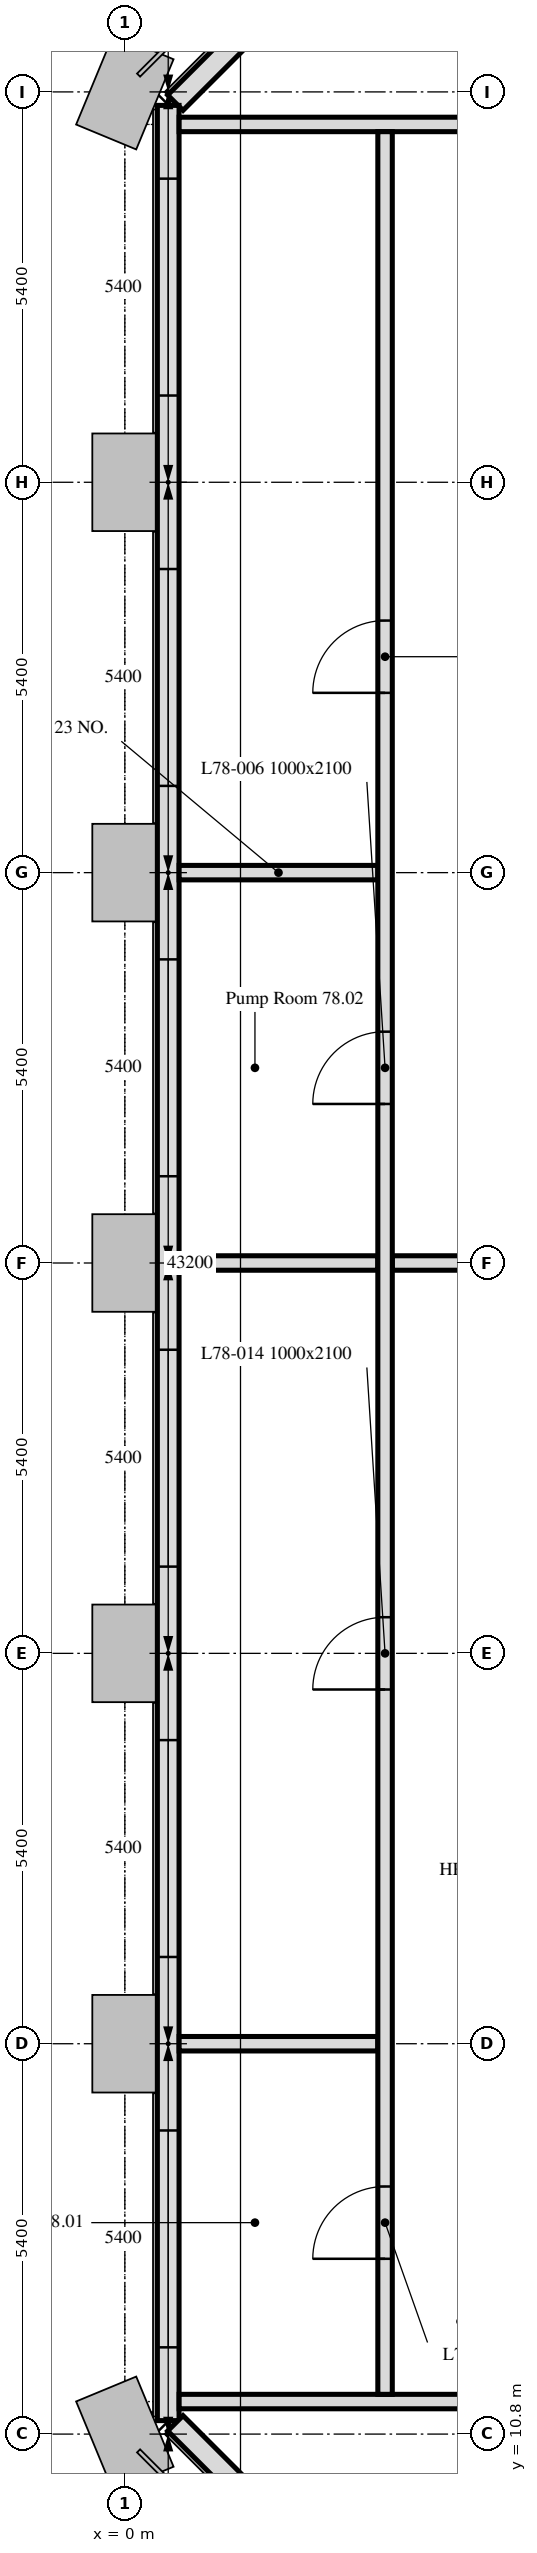
"""IFC4 building model, lengths in metres.
Left out: names, types, materials, properties, quantities, classifications, styles, units other than length and angle.
Written with IfcOpenShell. Run it as: python <this file> out.ifc"""

import sys

from ifc_helpers import new_model, si_unit, direction, frame, frame_2d, origin, place, context, subcontext, project, spatial, polyline, rectangle, outline, extrude, element, fill, save


model = new_model("IFC4")
c1 = context("Model", 3, precision=1e-05, world=origin(), true_north=direction((0.0, 1.0)))
c2 = subcontext(c1, "Body", "Model", "MODEL_VIEW")
j1 = project(units=[si_unit("LENGTHUNIT", "METRE"), si_unit("PLANEANGLEUNIT", "RADIAN")], contexts=[c1])
p1 = place(None, origin())
s1 = spatial("IfcSite", under=j1, at=p1, CompositionType="ELEMENT")
p2 = place(p1, origin())
s2 = spatial("IfcBuilding", under=s1, at=p2, CompositionType="ELEMENT")
p3 = place(p2, frame((0.0, 0.0, 312.7)))
s3 = spatial("IfcBuildingStorey", under=s2, at=p3, CompositionType="ELEMENT", Elevation=312.7)
p4 = place(p3, frame((5.55, 47.901, 0.0), z_axis=(0.0, 0.0, 1.0), x_axis=(-0.707106781187, -0.707106781187, 0.0)))
e1 = element("IfcWall", 1, at=p4, inside=s3, PredefinedType="SOLIDWALL", context=c2, shape_type="SweptSolid", body=[
    extrude(outline(polyline([(0.0, 0.0), (6.86, 0.0), (6.86, 4.2), (6.288, 4.2), (5.716, 4.2), (5.145, 4.2), (4.573, 4.2), (4.001, 4.2), (3.43, 4.2), (2.858, 4.2), (2.287, 4.2), (1.715, 4.2), (1.143, 4.2), (0.572, 4.2), (0.0, 4.2), (0.0, 0.0)])), frame((0.0, 0.15, 0.0), z_axis=(0.0, -1.0, 0.0), x_axis=(1.0, 0.0, 0.0)), (0.0, 0.0, 1.0), 0.3),
])
p5 = place(p3, frame((0.6, 43.014, 0.0), z_axis=(0.0, 0.0, 1.0), x_axis=(0.0, -1.0, 0.0)))
e2 = element("IfcWall", 2, at=p5, inside=s3, PredefinedType="SOLIDWALL", context=c2, shape_type="SweptSolid", body=[
    extrude(outline(polyline([(0.0, 0.0), (32.027, 0.0), (32.027, 4.2), (31.434, 4.2), (30.841, 4.2), (30.248, 4.2), (29.655, 4.2), (29.062, 4.2), (28.469, 4.2), (27.875, 4.2), (27.282, 4.2), (26.689, 4.2), (26.096, 4.2), (25.503, 4.2), (24.91, 4.2), (24.317, 4.2), (23.724, 4.2), (23.131, 4.2), (22.538, 4.2), (21.945, 4.2), (21.352, 4.2), (20.758, 4.2), (20.165, 4.2), (19.572, 4.2), (18.979, 4.2), (18.386, 4.2), (17.793, 4.2), (17.2, 4.2), (16.607, 4.2), (16.014, 4.2), (15.42, 4.2), (14.827, 4.2), (14.234, 4.2), (13.641, 4.2), (13.048, 4.2), (12.455, 4.2), (11.862, 4.2), (11.269, 4.2), (10.676, 4.2), (10.083, 4.2), (9.49, 4.2), (8.896, 4.2), (8.303, 4.2), (7.71, 4.2), (7.117, 4.2), (6.524, 4.2), (5.931, 4.2), (5.338, 4.2), (4.745, 4.2), (4.152, 4.2), (3.559, 4.2), (2.966, 4.2), (2.372, 4.2), (1.779, 4.2), (1.186, 4.2), (0.593, 4.2), (0.0, 4.2), (0.0, 0.0)])), frame((0.0, 0.15, 0.0), z_axis=(0.0, -1.0, 0.0), x_axis=(1.0, 0.0, 0.0)), (0.0, 0.0, 1.0), 0.3),
])
p6 = place(p5, frame((1.014, 0.0, 0.6)))
e3 = element("IfcOpeningElement", 3, at=p6, cuts=e2, PredefinedType="OPENING", context=c2, shape_type="SweptSolid", body=[
    extrude(rectangle(XDim=3.0, YDim=1.8, at=frame_2d((1.5, 0.9))), frame((0.0, 0.16, 0.0), z_axis=(0.0, -1.0, 0.0), x_axis=(1.0, 0.0, 0.0)), (0.0, 0.0, 1.0), 0.32),
])
p7 = place(p5, frame((6.414, 0.0, 0.6)))
e4 = element("IfcOpeningElement", 4, at=p7, cuts=e2, PredefinedType="OPENING", context=c2, shape_type="SweptSolid", body=[
    extrude(rectangle(XDim=3.0, YDim=1.8, at=frame_2d((1.5, 0.9))), frame((0.0, 0.16, 0.0), z_axis=(0.0, -1.0, 0.0), x_axis=(1.0, 0.0, 0.0)), (0.0, 0.0, 1.0), 0.32),
])
p8 = place(p5, frame((11.814, 0.0, 0.6)))
e5 = element("IfcOpeningElement", 5, at=p8, cuts=e2, PredefinedType="OPENING", context=c2, shape_type="SweptSolid", body=[
    extrude(rectangle(XDim=3.0, YDim=1.8, at=frame_2d((1.5, 0.9))), frame((0.0, 0.16, 0.0), z_axis=(0.0, -1.0, 0.0), x_axis=(1.0, 0.0, 0.0)), (0.0, 0.0, 1.0), 0.32),
])
p9 = place(p5, frame((17.214, 0.0, 0.6)))
e6 = element("IfcOpeningElement", 6, at=p9, cuts=e2, PredefinedType="OPENING", context=c2, shape_type="SweptSolid", body=[
    extrude(rectangle(XDim=3.0, YDim=1.8, at=frame_2d((1.5, 0.9))), frame((0.0, 0.16, 0.0), z_axis=(0.0, -1.0, 0.0), x_axis=(1.0, 0.0, 0.0)), (0.0, 0.0, 1.0), 0.32),
])
p10 = place(p5, frame((22.614, 0.0, 0.6)))
e7 = element("IfcOpeningElement", 7, at=p10, cuts=e2, PredefinedType="OPENING", context=c2, shape_type="SweptSolid", body=[
    extrude(rectangle(XDim=3.0, YDim=1.8, at=frame_2d((1.5, 0.9))), frame((0.0, 0.16, 0.0), z_axis=(0.0, -1.0, 0.0), x_axis=(1.0, 0.0, 0.0)), (0.0, 0.0, 1.0), 0.32),
])
p11 = place(p5, frame((28.014, 0.0, 0.6)))
e8 = element("IfcOpeningElement", 8, at=p11, cuts=e2, PredefinedType="OPENING", context=c2, shape_type="SweptSolid", body=[
    extrude(rectangle(XDim=3.0, YDim=1.8, at=frame_2d((1.5, 0.9))), frame((0.0, 0.16, 0.0), z_axis=(0.0, -1.0, 0.0), x_axis=(1.0, 0.0, 0.0)), (0.0, 0.0, 1.0), 0.32),
])
p12 = place(p3, frame((0.699, 10.949, 0.0), z_axis=(0.0, 0.0, 1.0), x_axis=(0.707106781187, -0.707106781187, 0.0)))
e9 = element("IfcWall", 9, at=p12, inside=s3, PredefinedType="SOLIDWALL", context=c2, shape_type="SweptSolid", body=[
    extrude(outline(polyline([(0.0, 0.0), (6.86, 0.0), (6.86, 4.2), (6.288, 4.2), (5.716, 4.2), (5.145, 4.2), (4.573, 4.2), (4.001, 4.2), (3.43, 4.2), (2.858, 4.2), (2.287, 4.2), (1.715, 4.2), (1.143, 4.2), (0.572, 4.2), (0.0, 4.2), (0.0, 0.0)])), frame((0.0, 0.15, 0.0), z_axis=(0.0, -1.0, 0.0), x_axis=(1.0, 0.0, 0.0)), (0.0, 0.0, 1.0), 0.3),
])
p13 = place(p3, frame((0.751, 32.4, 0.0), z_axis=(0.0, 0.0, 1.0), x_axis=(1.0, 0.0, 0.0)))
e10 = element("IfcWall", 10, at=p13, inside=s3, PredefinedType="PARTITIONING", context=c2, shape_type="SweptSolid", body=[
    extrude(rectangle(XDim=2.749, YDim=0.2, at=frame_2d((1.375, 0.0))), origin(), (0.0, 0.0, 1.0), 3.45),
])
p14 = place(p3, frame((42.449, 42.75, 0.0), z_axis=(0.0, 0.0, 1.0), x_axis=(-1.0, 0.0, 0.0)))
e11 = element("IfcWall", 11, at=p14, inside=s3, PredefinedType="PARTITIONING", context=c2, shape_type="SweptSolid", body=[
    extrude(rectangle(XDim=41.698, YDim=0.2, at=frame_2d((20.849, 0.0))), origin(), (0.0, 0.0, 1.0), 3.45),
])
p15 = place(p14, frame((12.249, 0.0, 0.0)))
e12 = element("IfcOpeningElement", 12, at=p15, cuts=e11, PredefinedType="OPENING", context=c2, shape_type="SweptSolid", body=[
    extrude(rectangle(XDim=1.0, YDim=2.1, at=frame_2d((0.5, 1.05))), frame((0.0, 0.1, 0.0), z_axis=(0.0, -1.0, 0.0), x_axis=(1.0, 0.0, 0.0)), (0.0, 0.0, 1.0), 0.2),
])
p16 = place(p14, frame((34.132, 0.0, 0.0)))
e13 = element("IfcOpeningElement", 13, at=p16, cuts=e11, PredefinedType="OPENING", context=c2, shape_type="SweptSolid", body=[
    extrude(rectangle(XDim=1.0, YDim=2.1, at=frame_2d((0.5, 1.05))), frame((0.0, 0.1, 0.0), z_axis=(0.0, -1.0, 0.0), x_axis=(1.0, 0.0, 0.0)), (0.0, 0.0, 1.0), 0.2),
])
p17 = place(p3, frame((0.751, 27.0, 0.0), z_axis=(0.0, 0.0, 1.0), x_axis=(1.0, 0.0, 0.0)))
e14 = element("IfcWall", 14, at=p17, inside=s3, PredefinedType="PARTITIONING", context=c2, shape_type="SweptSolid", body=[
    extrude(rectangle(XDim=2.749, YDim=0.2, at=frame_2d((1.375, 0.0))), origin(), (0.0, 0.0, 1.0), 3.45),
])
p18 = place(p3, frame((3.7, 27.0, 0.0), z_axis=(0.0, 0.0, 1.0), x_axis=(1.0, 0.0, 0.0)))
e15 = element("IfcWall", 15, at=p18, inside=s3, PredefinedType="PARTITIONING", context=c2, shape_type="SweptSolid", body=[
    extrude(rectangle(XDim=1.7, YDim=0.2, at=frame_2d((0.85, 0.0))), origin(), (0.0, 0.0, 1.0), 3.45),
])
p19 = place(p3, frame((3.5, 16.2, 0.0), z_axis=(0.0, 0.0, 1.0), x_axis=(-1.0, 0.0, 0.0)))
e16 = element("IfcWall", 16, at=p19, inside=s3, PredefinedType="PARTITIONING", context=c2, shape_type="SweptSolid", body=[
    extrude(rectangle(XDim=2.749, YDim=0.2, at=frame_2d((1.375, 0.0))), origin(), (0.0, 0.0, 1.0), 3.45),
])
p20 = place(p3, frame((0.751, 11.25, 0.0), z_axis=(0.0, 0.0, 1.0), x_axis=(1.0, 0.0, 0.0)))
e17 = element("IfcWall", 17, at=p20, inside=s3, PredefinedType="PARTITIONING", context=c2, shape_type="SweptSolid", body=[
    extrude(rectangle(XDim=41.698, YDim=0.2, at=frame_2d((20.849, 0.0))), origin(), (0.0, 0.0, 1.0), 4.2),
])
p21 = place(p20, frame((33.849, 0.0, 0.0)))
e18 = element("IfcOpeningElement", 18, at=p21, cuts=e17, PredefinedType="OPENING", context=c2, shape_type="SweptSolid", body=[
    extrude(rectangle(XDim=1.0, YDim=2.1, at=frame_2d((0.5, 1.05))), frame((0.0, 0.1, 0.0), z_axis=(0.0, -1.0, 0.0), x_axis=(1.0, 0.0, 0.0)), (0.0, 0.0, 1.0), 0.2),
])
p22 = place(p20, frame((17.666, 0.0, 0.0)))
e19 = element("IfcOpeningElement", 19, at=p22, cuts=e17, PredefinedType="OPENING", context=c2, shape_type="SweptSolid", body=[
    extrude(rectangle(XDim=1.0, YDim=2.1, at=frame_2d((0.5, 1.05))), frame((0.0, 0.1, 0.0), z_axis=(0.0, -1.0, 0.0), x_axis=(1.0, 0.0, 0.0)), (0.0, 0.0, 1.0), 0.2),
])
p23 = place(p20, frame((6.816, 0.0, 0.0)))
e20 = element("IfcOpeningElement", 20, at=p23, cuts=e17, PredefinedType="OPENING", context=c2, shape_type="SweptSolid", body=[
    extrude(rectangle(XDim=1.0, YDim=2.1, at=frame_2d((0.5, 1.05))), frame((0.0, 0.1, 0.0), z_axis=(0.0, -1.0, 0.0), x_axis=(1.0, 0.0, 0.0)), (0.0, 0.0, 1.0), 0.2),
])
p24 = place(p3, frame((3.6, 11.35, 0.0), z_axis=(0.0, 0.0, 1.0), x_axis=(0.0, 1.0, 0.0)))
e21 = element("IfcWall", 21, at=p24, inside=s3, PredefinedType="PARTITIONING", context=c2, shape_type="SweptSolid", body=[
    extrude(rectangle(XDim=31.3, YDim=0.2, at=frame_2d((15.65, 0.0))), origin(), (0.0, 0.0, 1.0), 3.45),
])
p25 = place(p24, frame((23.537, 0.0, 0.0)))
e22 = element("IfcOpeningElement", 22, at=p25, cuts=e21, PredefinedType="OPENING", context=c2, shape_type="SweptSolid", body=[
    extrude(rectangle(XDim=1.0, YDim=2.1, at=frame_2d((0.5, 1.05))), frame((0.0, 0.1, 0.0), z_axis=(0.0, -1.0, 0.0), x_axis=(1.0, 0.0, 0.0)), (0.0, 0.0, 1.0), 0.2),
])
p26 = place(p24, frame((17.85, 0.0, 0.0)))
e23 = element("IfcOpeningElement", 23, at=p26, cuts=e21, PredefinedType="OPENING", context=c2, shape_type="SweptSolid", body=[
    extrude(rectangle(XDim=1.0, YDim=2.1, at=frame_2d((0.5, 1.05))), frame((0.0, 0.1, 0.0), z_axis=(0.0, -1.0, 0.0), x_axis=(1.0, 0.0, 0.0)), (0.0, 0.0, 1.0), 0.2),
])
p27 = place(p24, frame((1.875, 0.0, 0.0)))
e24 = element("IfcOpeningElement", 24, at=p27, cuts=e21, PredefinedType="OPENING", context=c2, shape_type="SweptSolid", body=[
    extrude(rectangle(XDim=1.0, YDim=2.1, at=frame_2d((0.5, 1.05))), frame((0.0, 0.1, 0.0), z_axis=(0.0, -1.0, 0.0), x_axis=(1.0, 0.0, 0.0)), (0.0, 0.0, 1.0), 0.2),
])
p28 = place(p24, frame((9.75, 0.0, 0.0)))
e25 = element("IfcOpeningElement", 25, at=p28, cuts=e21, PredefinedType="OPENING", context=c2, shape_type="SweptSolid", body=[
    extrude(rectangle(XDim=1.0, YDim=2.1, at=frame_2d((0.5, 1.05))), frame((0.0, 0.1, 0.0), z_axis=(0.0, -1.0, 0.0), x_axis=(1.0, 0.0, 0.0)), (0.0, 0.0, 1.0), 0.2),
])
p29 = place(p6, origin())
e26 = element("IfcWindow", 26, at=p29, inside=s3, PartitioningType="SINGLE_PANEL", PredefinedType="WINDOW", context=c2, shape_type="SweptSolid", body=[
    extrude(rectangle(XDim=3.0, YDim=1.8, at=frame_2d((1.5, 0.9))), frame((0.0, 0.03, 0.0), z_axis=(0.0, -1.0, 0.0), x_axis=(1.0, 0.0, 0.0)), (0.0, 0.0, 1.0), 0.06),
])
fill(e3, e26)
p30 = place(p7, origin())
e27 = element("IfcWindow", 27, at=p30, inside=s3, PartitioningType="SINGLE_PANEL", PredefinedType="WINDOW", context=c2, shape_type="SweptSolid", body=[
    extrude(rectangle(XDim=3.0, YDim=1.8, at=frame_2d((1.5, 0.9))), frame((0.0, 0.03, 0.0), z_axis=(0.0, -1.0, 0.0), x_axis=(1.0, 0.0, 0.0)), (0.0, 0.0, 1.0), 0.06),
])
fill(e4, e27)
p31 = place(p8, origin())
e28 = element("IfcWindow", 28, at=p31, inside=s3, PartitioningType="SINGLE_PANEL", PredefinedType="WINDOW", context=c2, shape_type="SweptSolid", body=[
    extrude(rectangle(XDim=3.0, YDim=1.8, at=frame_2d((1.5, 0.9))), frame((0.0, 0.03, 0.0), z_axis=(0.0, -1.0, 0.0), x_axis=(1.0, 0.0, 0.0)), (0.0, 0.0, 1.0), 0.06),
])
fill(e5, e28)
p32 = place(p9, origin())
e29 = element("IfcWindow", 29, at=p32, inside=s3, PartitioningType="SINGLE_PANEL", PredefinedType="WINDOW", context=c2, shape_type="SweptSolid", body=[
    extrude(rectangle(XDim=3.0, YDim=1.8, at=frame_2d((1.5, 0.9))), frame((0.0, 0.03, 0.0), z_axis=(0.0, -1.0, 0.0), x_axis=(1.0, 0.0, 0.0)), (0.0, 0.0, 1.0), 0.06),
])
fill(e6, e29)
p33 = place(p10, origin())
e30 = element("IfcWindow", 30, at=p33, inside=s3, PartitioningType="SINGLE_PANEL", PredefinedType="WINDOW", context=c2, shape_type="SweptSolid", body=[
    extrude(rectangle(XDim=3.0, YDim=1.8, at=frame_2d((1.5, 0.9))), frame((0.0, 0.03, 0.0), z_axis=(0.0, -1.0, 0.0), x_axis=(1.0, 0.0, 0.0)), (0.0, 0.0, 1.0), 0.06),
])
fill(e7, e30)
p34 = place(p11, origin())
e31 = element("IfcWindow", 31, at=p34, inside=s3, PartitioningType="SINGLE_PANEL", PredefinedType="WINDOW", context=c2, shape_type="SweptSolid", body=[
    extrude(rectangle(XDim=3.0, YDim=1.8, at=frame_2d((1.5, 0.9))), frame((0.0, 0.03, 0.0), z_axis=(0.0, -1.0, 0.0), x_axis=(1.0, 0.0, 0.0)), (0.0, 0.0, 1.0), 0.06),
])
fill(e8, e31)
p35 = place(p25, origin())
e32 = element("IfcDoor", 32, at=p35, inside=s3, OperationType="SINGLE_SWING_LEFT", PredefinedType="DOOR", context=c2, shape_type="SweptSolid", body=[
    extrude(rectangle(XDim=1.0, YDim=2.1, at=frame_2d((0.5, 1.05))), frame((0.0, 0.025, 0.0), z_axis=(0.0, -1.0, 0.0), x_axis=(1.0, 0.0, 0.0)), (0.0, 0.0, 1.0), 0.05),
])
fill(e22, e32)
p36 = place(p26, origin())
e33 = element("IfcDoor", 33, at=p36, inside=s3, OperationType="SINGLE_SWING_RIGHT", PredefinedType="DOOR", context=c2, shape_type="SweptSolid", body=[
    extrude(rectangle(XDim=1.0, YDim=2.1, at=frame_2d((0.5, 1.05))), frame((0.0, 0.025, 0.0), z_axis=(0.0, -1.0, 0.0), x_axis=(1.0, 0.0, 0.0)), (0.0, 0.0, 1.0), 0.05),
])
fill(e23, e33)
p37 = place(p27, origin())
e34 = element("IfcDoor", 34, at=p37, inside=s3, OperationType="SINGLE_SWING_LEFT", PredefinedType="DOOR", context=c2, shape_type="SweptSolid", body=[
    extrude(rectangle(XDim=1.0, YDim=2.1, at=frame_2d((0.5, 1.05))), frame((0.0, 0.025, 0.0), z_axis=(0.0, -1.0, 0.0), x_axis=(1.0, 0.0, 0.0)), (0.0, 0.0, 1.0), 0.05),
])
fill(e24, e34)
p38 = place(p28, origin())
e35 = element("IfcDoor", 35, at=p38, inside=s3, OperationType="SINGLE_SWING_RIGHT", PredefinedType="DOOR", context=c2, shape_type="SweptSolid", body=[
    extrude(rectangle(XDim=1.0, YDim=2.1, at=frame_2d((0.5, 1.05))), frame((0.0, 0.025, 0.0), z_axis=(0.0, -1.0, 0.0), x_axis=(1.0, 0.0, 0.0)), (0.0, 0.0, 1.0), 0.05),
])
fill(e25, e35)
save(model, sys.argv[1])
